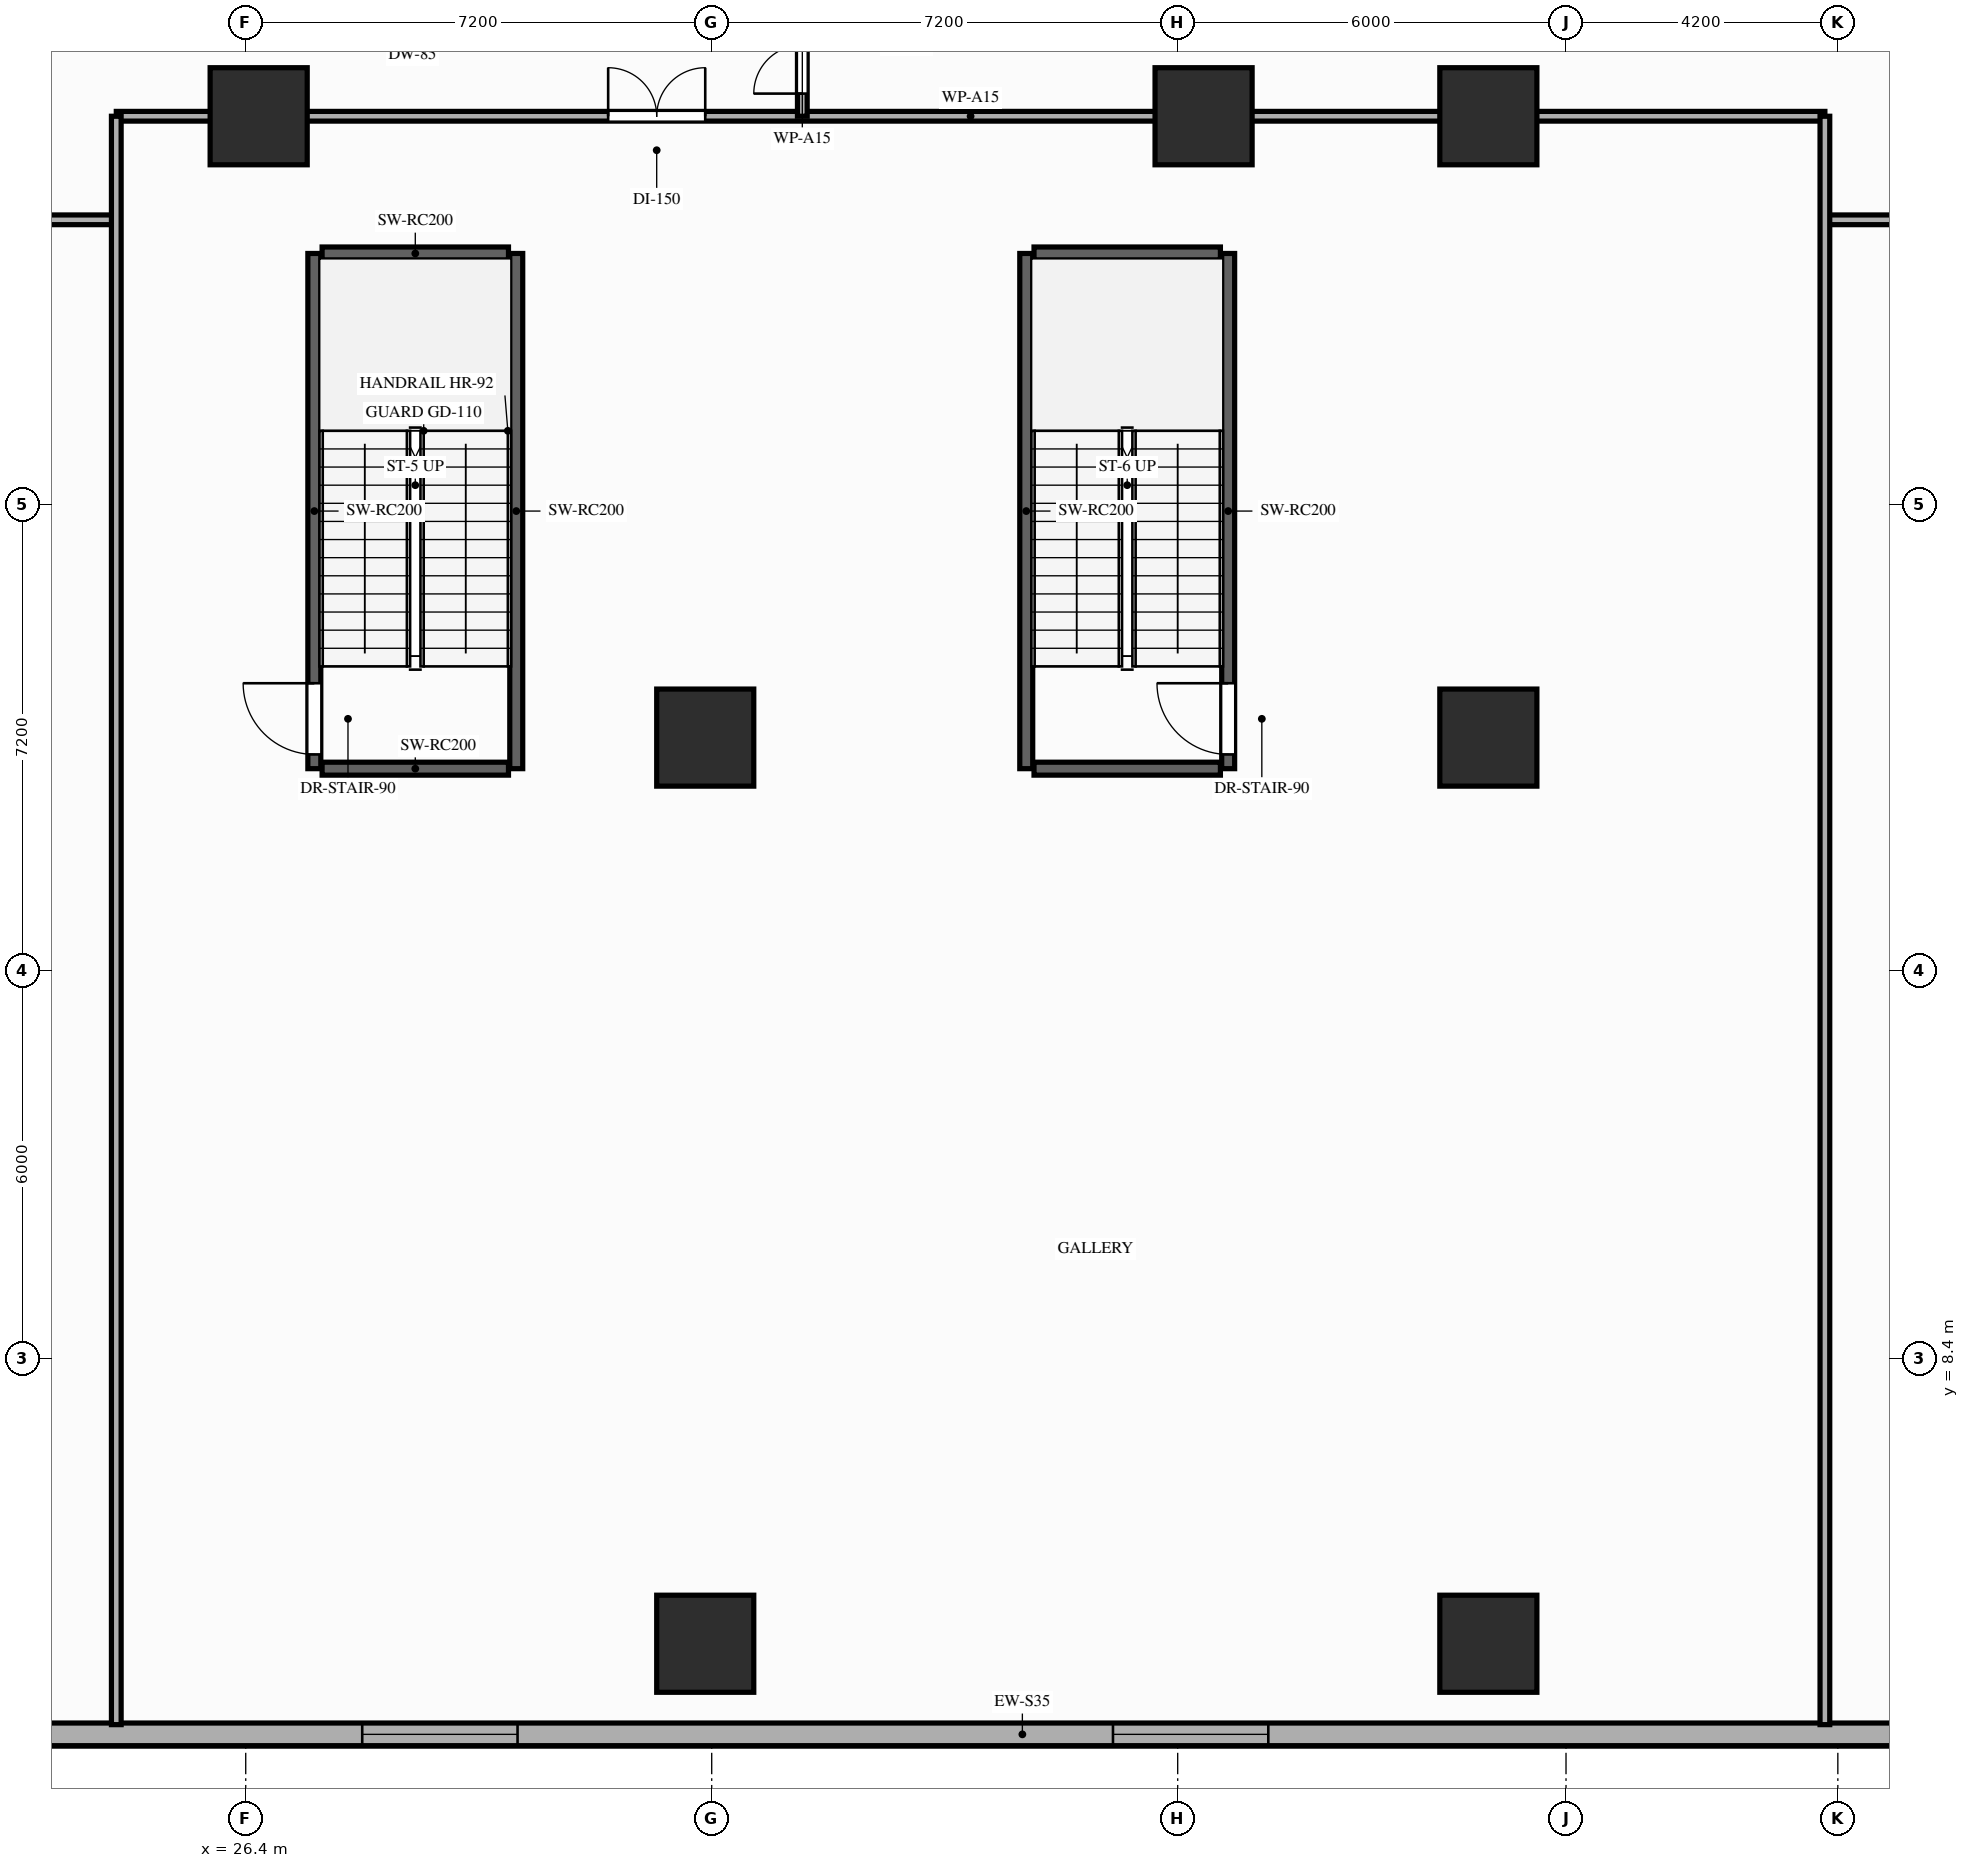
"""IFC4 building model, lengths in metres.
Left out: names, types, materials, properties, quantities, classifications, styles, units other than length and angle.
Written with IfcOpenShell. Run it as: python <this file> out.ifc"""

import sys

from ifc_helpers import new_model, si_unit, direction, frame, frame_2d, origin, origin_2d, place, context, subcontext, project, spatial, rectangle, extrude, element, fill, save


model = new_model("IFC4")
c1 = context("Model", 3, precision=1e-05, world=origin(), true_north=direction((0.0, 1.0)))
c2 = subcontext(c1, "Body", "Model", "MODEL_VIEW")
j1 = project(units=[si_unit("LENGTHUNIT", "METRE"), si_unit("PLANEANGLEUNIT", "RADIAN")], contexts=[c1])
p1 = place(None, origin())
s1 = spatial("IfcSite", under=j1, at=p1, CompositionType="ELEMENT")
p2 = place(p1, origin())
s2 = spatial("IfcBuilding", under=s1, at=p2, CompositionType="ELEMENT")
p3 = place(p2, frame((0.0, 0.0, 13.0)))
s3 = spatial("IfcBuildingStorey", under=s2, at=p3, CompositionType="ELEMENT", Elevation=13.0)
for number, where, z_axis, x_axis in (
    (1, (26.6, 27.6, 0.0), (0.0, 0.0, 1.0), (1.0, 0.0, 0.0)),
    (2, (41.2, 27.6, 0.0), (0.0, 0.0, 1.0), (1.0, 0.0, 0.0)),
    (3, (45.6, 27.6, 0.0), (0.0, 0.0, 1.0), (1.0, 0.0, 0.0)),
    (4, (33.5, 4.0, 0.0), (0.0, 0.0, 1.0), (1.0, 0.0, 0.0)),
    (5, (45.6, 4.0, 0.0), (0.0, 0.0, 1.0), (1.0, 0.0, 0.0)),
    (6, (33.5, 18.0, 0.0), (0.0, 0.0, 1.0), (1.0, 0.0, 0.0)),
    (7, (45.6, 18.0, 0.0), (0.0, 0.0, 1.0), (1.0, 0.0, 0.0)),
):
    element("IfcColumn", number, at=place(p3, frame(where, z_axis=z_axis, x_axis=x_axis)), inside=s3, PredefinedType="COLUMN", context=c2, shape_type="SweptSolid", body=[
        extrude(rectangle(XDim=1.5, YDim=1.5, at=origin_2d()), origin(), (0.0, 0.0, 1.0), 4.6),
    ])
p4 = place(p3, frame((3.6, 2.6, 0.0), z_axis=(0.0, 0.0, 1.0), x_axis=(1.0, 0.0, 0.0)))
e8 = element("IfcWall", 8, at=p4, inside=s3, PredefinedType="STANDARD", context=c2, shape_type="SweptSolid", body=[
    extrude(rectangle(XDim=69.6, YDim=0.35, at=frame_2d((34.8, 0.0))), origin(), (0.0, 0.0, 1.0), 4.35),
])
p5 = place(p4, frame((17.2, 0.0, 0.9)))
e9 = element("IfcOpeningElement", 9, at=p5, cuts=e8, PredefinedType="OPENING", context=c2, shape_type="SweptSolid", body=[
    extrude(rectangle(XDim=2.4, YDim=2.15, at=frame_2d((1.2, 1.075))), frame((0.0, 0.185, 0.0), z_axis=(0.0, -1.0, 0.0), x_axis=(1.0, 0.0, 0.0)), (0.0, 0.0, 1.0), 0.37),
])
p6 = place(p4, frame((24.6, 0.0, 0.9)))
e10 = element("IfcOpeningElement", 10, at=p6, cuts=e8, PredefinedType="OPENING", context=c2, shape_type="SweptSolid", body=[
    extrude(rectangle(XDim=2.4, YDim=2.15, at=frame_2d((1.2, 1.075))), frame((0.0, 0.185, 0.0), z_axis=(0.0, -1.0, 0.0), x_axis=(1.0, 0.0, 0.0)), (0.0, 0.0, 1.0), 0.37),
])
p7 = place(p4, frame((36.2, 0.0, 0.9)))
e11 = element("IfcOpeningElement", 11, at=p7, cuts=e8, PredefinedType="OPENING", context=c2, shape_type="SweptSolid", body=[
    extrude(rectangle(XDim=2.4, YDim=2.15, at=frame_2d((1.2, 1.075))), frame((0.0, 0.185, 0.0), z_axis=(0.0, -1.0, 0.0), x_axis=(1.0, 0.0, 0.0)), (0.0, 0.0, 1.0), 0.37),
])
p8 = place(p4, frame((48.4, 0.0, 0.9)))
e12 = element("IfcOpeningElement", 12, at=p8, cuts=e8, PredefinedType="OPENING", context=c2, shape_type="SweptSolid", body=[
    extrude(rectangle(XDim=2.4, YDim=2.15, at=frame_2d((1.2, 1.075))), frame((0.0, 0.185, 0.0), z_axis=(0.0, -1.0, 0.0), x_axis=(1.0, 0.0, 0.0)), (0.0, 0.0, 1.0), 0.37),
])
p9 = place(p4, frame((64.0, 0.0, 0.9)))
e13 = element("IfcOpeningElement", 13, at=p9, cuts=e8, PredefinedType="OPENING", context=c2, shape_type="SweptSolid", body=[
    extrude(rectangle(XDim=2.4, YDim=2.15, at=frame_2d((1.2, 1.075))), frame((0.0, 0.185, 0.0), z_axis=(0.0, -1.0, 0.0), x_axis=(1.0, 0.0, 0.0)), (0.0, 0.0, 1.0), 0.37),
])
p10 = place(p3, frame((27.46, 17.52, 0.0), z_axis=(0.0, 0.0, 1.0), x_axis=(0.0, 1.0, 0.0)))
e14 = element("IfcWall", 14, at=p10, inside=s3, PredefinedType="SHEAR", context=c2, shape_type="SweptSolid", body=[
    extrude(rectangle(XDim=7.96, YDim=0.2, at=frame_2d((3.98, 0.0))), origin(), (0.0, 0.0, 1.0), 4.35),
])
p11 = place(p10, frame((0.22, 0.0, 0.0)))
e15 = element("IfcOpeningElement", 15, at=p11, cuts=e14, PredefinedType="OPENING", context=c2, shape_type="SweptSolid", body=[
    extrude(rectangle(XDim=1.1, YDim=2.15, at=frame_2d((0.55, 1.075))), frame((0.0, 0.11, 0.0), z_axis=(0.0, -1.0, 0.0), x_axis=(1.0, 0.0, 0.0)), (0.0, 0.0, 1.0), 0.22),
])
p12 = place(p3, frame((30.58, 17.52, 0.0), z_axis=(0.0, 0.0, 1.0), x_axis=(0.0, 1.0, 0.0)))
e16 = element("IfcWall", 16, at=p12, inside=s3, PredefinedType="SHEAR", context=c2, shape_type="SweptSolid", body=[
    extrude(rectangle(XDim=7.96, YDim=0.2, at=frame_2d((3.98, 0.0))), origin(), (0.0, 0.0, 1.0), 4.35),
])
for number, where, z_axis, x_axis in (
    (17, (27.58, 25.48, 0.0), (0.0, 0.0, 1.0), (1.0, 0.0, 0.0)),
    (18, (27.58, 17.52, 0.0), (0.0, 0.0, 1.0), (1.0, 0.0, 0.0)),
):
    element("IfcWall", number, at=place(p3, frame(where, z_axis=z_axis, x_axis=x_axis)), inside=s3, PredefinedType="SHEAR", context=c2, shape_type="SweptSolid", body=[
        extrude(rectangle(XDim=2.88, YDim=0.2, at=frame_2d((1.44, 0.0))), origin(), (0.0, 0.0, 1.0), 4.35),
    ])
p13 = place(p3, frame((38.46, 17.52, 0.0), z_axis=(0.0, 0.0, 1.0), x_axis=(0.0, 1.0, 0.0)))
e19 = element("IfcWall", 19, at=p13, inside=s3, PredefinedType="SHEAR", context=c2, shape_type="SweptSolid", body=[
    extrude(rectangle(XDim=7.96, YDim=0.2, at=frame_2d((3.98, 0.0))), origin(), (0.0, 0.0, 1.0), 4.35),
])
p14 = place(p3, frame((41.58, 17.52, 0.0), z_axis=(0.0, 0.0, 1.0), x_axis=(0.0, 1.0, 0.0)))
e20 = element("IfcWall", 20, at=p14, inside=s3, PredefinedType="SHEAR", context=c2, shape_type="SweptSolid", body=[
    extrude(rectangle(XDim=7.96, YDim=0.2, at=frame_2d((3.98, 0.0))), origin(), (0.0, 0.0, 1.0), 4.35),
])
p15 = place(p14, frame((0.22, 0.0, 0.0)))
e21 = element("IfcOpeningElement", 21, at=p15, cuts=e20, PredefinedType="OPENING", context=c2, shape_type="SweptSolid", body=[
    extrude(rectangle(XDim=1.1, YDim=2.15, at=frame_2d((0.55, 1.075))), frame((0.0, 0.11, 0.0), z_axis=(0.0, -1.0, 0.0), x_axis=(1.0, 0.0, 0.0)), (0.0, 0.0, 1.0), 0.22),
])
for number, where, z_axis, x_axis in (
    (22, (38.58, 25.48, 0.0), (0.0, 0.0, 1.0), (1.0, 0.0, 0.0)),
    (23, (38.58, 17.52, 0.0), (0.0, 0.0, 1.0), (1.0, 0.0, 0.0)),
):
    element("IfcWall", number, at=place(p3, frame(where, z_axis=z_axis, x_axis=x_axis)), inside=s3, PredefinedType="SHEAR", context=c2, shape_type="SweptSolid", body=[
        extrude(rectangle(XDim=2.88, YDim=0.2, at=frame_2d((1.44, 0.0))), origin(), (0.0, 0.0, 1.0), 4.35),
    ])
p16 = place(p3, frame((6.6, 26.0, 0.0), z_axis=(0.0, 0.0, 1.0), x_axis=(1.0, 0.0, 0.0)))
e24 = element("IfcWall", 24, at=p16, inside=s3, PredefinedType="PARTITIONING", context=c2, shape_type="SweptSolid", body=[
    extrude(rectangle(XDim=17.8, YDim=0.15, at=frame_2d((8.9, 0.0))), origin(), (0.0, 0.0, 1.0), 3.63),
])
p17 = place(p16, frame((9.4, 0.0, 0.0)))
e25 = element("IfcOpeningElement", 25, at=p17, cuts=e24, PredefinedType="OPENING", context=c2, shape_type="SweptSolid", body=[
    extrude(rectangle(XDim=1.5, YDim=2.18, at=frame_2d((0.75, 1.09))), frame((0.0, 0.085, 0.0), z_axis=(0.0, -1.0, 0.0), x_axis=(1.0, 0.0, 0.0)), (0.0, 0.0, 1.0), 0.17),
])
p18 = place(p3, frame((24.4, 27.6, 0.0), z_axis=(0.0, 0.0, 1.0), x_axis=(1.0, 0.0, 0.0)))
e26 = element("IfcWall", 26, at=p18, inside=s3, PredefinedType="PARTITIONING", context=c2, shape_type="SweptSolid", body=[
    extrude(rectangle(XDim=26.4, YDim=0.15, at=frame_2d((13.2, 0.0))), origin(), (0.0, 0.0, 1.0), 3.63),
])
p19 = place(p18, frame((7.6, 0.0, 0.0)))
e27 = element("IfcOpeningElement", 27, at=p19, cuts=e26, PredefinedType="OPENING", context=c2, shape_type="SweptSolid", body=[
    extrude(rectangle(XDim=1.5, YDim=2.18, at=frame_2d((0.75, 1.09))), frame((0.0, 0.085, 0.0), z_axis=(0.0, -1.0, 0.0), x_axis=(1.0, 0.0, 0.0)), (0.0, 0.0, 1.0), 0.17),
])
p20 = place(p3, frame((50.8, 26.0, 0.0), z_axis=(0.0, 0.0, 1.0), x_axis=(1.0, 0.0, 0.0)))
e28 = element("IfcWall", 28, at=p20, inside=s3, PredefinedType="PARTITIONING", context=c2, shape_type="SweptSolid", body=[
    extrude(rectangle(XDim=11.6, YDim=0.15, at=frame_2d((5.8, 0.0))), origin(), (0.0, 0.0, 1.0), 3.63),
])
p21 = place(p20, frame((3.7, 0.0, 0.0)))
e29 = element("IfcOpeningElement", 29, at=p21, cuts=e28, PredefinedType="OPENING", context=c2, shape_type="SweptSolid", body=[
    extrude(rectangle(XDim=1.5, YDim=2.18, at=frame_2d((0.75, 1.09))), frame((0.0, 0.085, 0.0), z_axis=(0.0, -1.0, 0.0), x_axis=(1.0, 0.0, 0.0)), (0.0, 0.0, 1.0), 0.17),
])
p22 = place(p3, frame((35.0, 27.6, 0.0), z_axis=(0.0, 0.0, 1.0), x_axis=(0.0, 1.0, 0.0)))
e30 = element("IfcWall", 30, at=p22, inside=s3, PredefinedType="PARTITIONING", context=c2, shape_type="SweptSolid", body=[
    extrude(rectangle(XDim=2.2, YDim=0.15, at=frame_2d((1.1, 0.0))), origin(), (0.0, 0.0, 1.0), 3.63),
])
p23 = place(p22, frame((0.35, 0.0, 0.0)))
e31 = element("IfcOpeningElement", 31, at=p23, cuts=e30, PredefinedType="OPENING", context=c2, shape_type="SweptSolid", body=[
    extrude(rectangle(XDim=1.5, YDim=2.18, at=frame_2d((0.75, 1.09))), frame((0.0, 0.085, 0.0), z_axis=(0.0, -1.0, 0.0), x_axis=(1.0, 0.0, 0.0)), (0.0, 0.0, 1.0), 0.17),
])
for number, where, z_axis, x_axis in (
    (32, (24.4, 2.75, 0.0), (0.0, 0.0, 1.0), (0.0, 1.0, 0.0)),
    (33, (50.8, 2.75, 0.0), (0.0, 0.0, 1.0), (0.0, 1.0, 0.0)),
):
    element("IfcWall", number, at=place(p3, frame(where, z_axis=z_axis, x_axis=x_axis)), inside=s3, PredefinedType="PARTITIONING", context=c2, shape_type="SweptSolid", body=[
        extrude(rectangle(XDim=24.85, YDim=0.15, at=frame_2d((12.425, 0.0))), origin(), (0.0, 0.0, 1.0), 3.63),
    ])
p24 = place(p6, origin())
e34 = element("IfcWindow", 34, at=p24, inside=s3, PartitioningType="SINGLE_PANEL", PredefinedType="WINDOW", context=c2, shape_type="SweptSolid", body=[
    extrude(rectangle(XDim=2.4, YDim=2.15, at=frame_2d((1.2, 1.075))), frame((0.0, 0.03, 0.0), z_axis=(0.0, -1.0, 0.0), x_axis=(1.0, 0.0, 0.0)), (0.0, 0.0, 1.0), 0.06),
])
fill(e10, e34)
p25 = place(p7, origin())
e35 = element("IfcWindow", 35, at=p25, inside=s3, PartitioningType="SINGLE_PANEL", PredefinedType="WINDOW", context=c2, shape_type="SweptSolid", body=[
    extrude(rectangle(XDim=2.4, YDim=2.15, at=frame_2d((1.2, 1.075))), frame((0.0, 0.03, 0.0), z_axis=(0.0, -1.0, 0.0), x_axis=(1.0, 0.0, 0.0)), (0.0, 0.0, 1.0), 0.06),
])
fill(e11, e35)
p26 = place(p11, origin())
e36 = element("IfcDoor", 36, at=p26, inside=s3, OperationType="SINGLE_SWING_RIGHT", PredefinedType="DOOR", context=c2, shape_type="SweptSolid", body=[
    extrude(rectangle(XDim=1.1, YDim=2.15, at=frame_2d((0.55, 1.075))), frame((0.0, 0.025, 0.0), z_axis=(0.0, -1.0, 0.0), x_axis=(1.0, 0.0, 0.0)), (0.0, 0.0, 1.0), 0.05),
])
fill(e15, e36)
p27 = place(p15, origin())
e37 = element("IfcDoor", 37, at=p27, inside=s3, OperationType="SINGLE_SWING_RIGHT", PredefinedType="DOOR", context=c2, shape_type="SweptSolid", body=[
    extrude(rectangle(XDim=1.1, YDim=2.15, at=frame_2d((0.55, 1.075))), frame((0.0, 0.025, 0.0), z_axis=(0.0, -1.0, 0.0), x_axis=(1.0, 0.0, 0.0)), (0.0, 0.0, 1.0), 0.05),
])
fill(e21, e37)
p28 = place(p23, origin())
e38 = element("IfcDoor", 38, at=p28, inside=s3, OperationType="DOUBLE_DOOR_SINGLE_SWING", PredefinedType="DOOR", context=c2, shape_type="SweptSolid", body=[
    extrude(rectangle(XDim=1.5, YDim=2.18, at=frame_2d((0.75, 1.09))), frame((0.0, 0.025, 0.0), z_axis=(0.0, -1.0, 0.0), x_axis=(1.0, 0.0, 0.0)), (0.0, 0.0, 1.0), 0.05),
])
fill(e31, e38)
p29 = place(p19, origin())
e39 = element("IfcDoor", 39, at=p29, inside=s3, OperationType="DOUBLE_DOOR_SINGLE_SWING", PredefinedType="DOOR", context=c2, shape_type="SweptSolid", body=[
    extrude(rectangle(XDim=1.5, YDim=2.18, at=frame_2d((0.75, 1.09))), frame((0.0, 0.025, 0.0), z_axis=(0.0, -1.0, 0.0), x_axis=(1.0, 0.0, 0.0)), (0.0, 0.0, 1.0), 0.05),
])
fill(e27, e39)
save(model, sys.argv[1])
